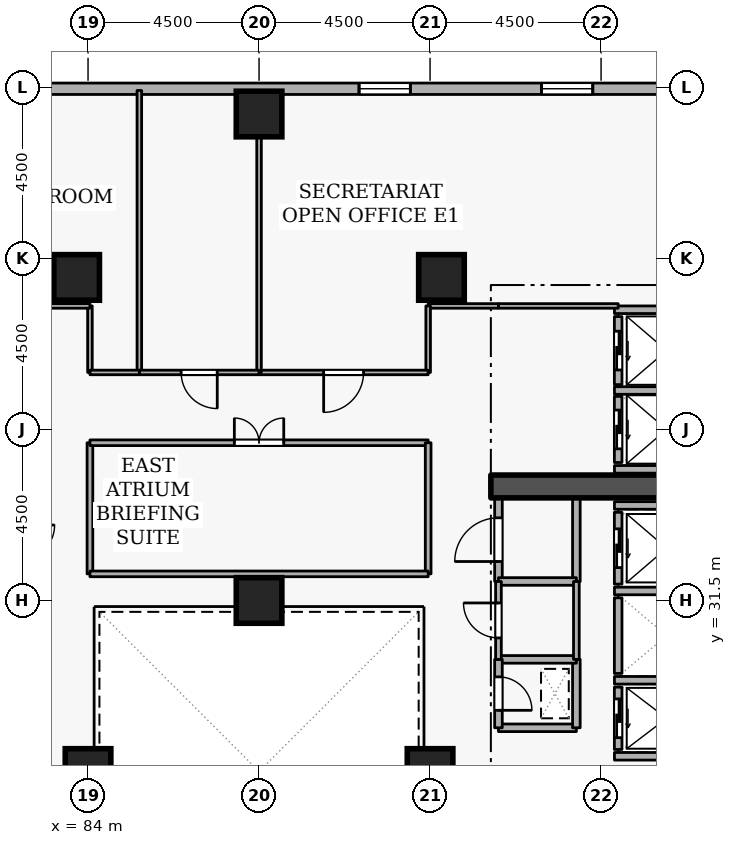
"""IFC4 building model, lengths in metres.
Left out: names, types, materials, properties, quantities, classifications, styles, units other than length and angle.
Written with IfcOpenShell. Run it as: python <this file> out.ifc"""

import sys

from ifc_helpers import new_model, si_unit, direction, frame, frame_2d, origin, origin_2d, place, context, subcontext, project, spatial, rectangle, extrude, element, fill, save


model = new_model("IFC4")
c1 = context("Model", 3, precision=1e-05, world=origin(), true_north=direction((0.0, 1.0)))
c2 = subcontext(c1, "Body", "Model", "MODEL_VIEW")
j1 = project(units=[si_unit("LENGTHUNIT", "METRE"), si_unit("PLANEANGLEUNIT", "RADIAN")], contexts=[c1])
p1 = place(None, origin())
s1 = spatial("IfcSite", under=j1, at=p1, CompositionType="ELEMENT")
p2 = place(p1, origin())
s2 = spatial("IfcBuilding", under=s1, at=p2, CompositionType="ELEMENT")
p3 = place(p2, frame((0.0, 0.0, 116.1)))
s3 = spatial("IfcBuildingStorey", under=s2, at=p3, CompositionType="ELEMENT", Elevation=116.1)
p4 = place(p3, frame((94.6, 34.5, 0.0), z_axis=(0.0, 0.0, 1.0), x_axis=(1.0, 0.0, 0.0)))
e1 = element("IfcWall", 1, at=p4, inside=s3, PredefinedType="SHEAR", context=c2, shape_type="SweptSolid", body=[
    extrude(rectangle(XDim=5.7, YDim=0.6, at=frame_2d((2.85, 0.0))), origin(), (0.0, 0.0, 1.0), 3.6),
])
for number, where, z_axis, x_axis in (
    (2, (88.5, 44.3, 0.0), (0.0, 0.0, 1.0), (1.0, 0.0, 0.0)),
    (3, (93.3, 40.0, 0.0), (0.0, 0.0, 1.0), (1.0, 0.0, 0.0)),
    (4, (83.7, 40.0, 0.0), (0.0, 0.0, 1.0), (1.0, 0.0, 0.0)),
    (5, (93.0, 27.0, 0.0), (0.0, 0.0, 1.0), (1.0, 0.0, 0.0)),
    (6, (84.0, 27.0, 0.0), (0.0, 0.0, 1.0), (1.0, 0.0, 0.0)),
    (7, (88.5, 31.5, 0.0), (0.0, 0.0, 1.0), (1.0, 0.0, 0.0)),
):
    element("IfcColumn", number, at=place(p3, frame(where, z_axis=z_axis, x_axis=x_axis)), inside=s3, PredefinedType="COLUMN", context=c2, shape_type="SweptSolid", body=[
        extrude(rectangle(XDim=1.2, YDim=1.2, at=origin_2d()), origin(), (0.0, 0.0, 1.0), 3.6),
    ])
p5 = place(p3, frame((103.881, 44.965, 0.0), z_axis=(0.0, 0.0, 1.0), x_axis=(-1.0, 0.0, 0.0)))
e8 = element("IfcWall", 8, at=p5, inside=s3, PredefinedType="STANDARD", context=c2, shape_type="SweptSolid", body=[
    extrude(rectangle(XDim=36.763, YDim=0.3, at=frame_2d((18.381, 0.0))), origin(), (0.0, 0.0, 1.0), 2.22),
])
p6 = place(p5, frame((6.6, 0.0, 0.72)))
e9 = element("IfcOpeningElement", 9, at=p6, cuts=e8, PredefinedType="OPENING", context=c2, shape_type="SweptSolid", body=[
    extrude(rectangle(XDim=1.35, YDim=1.05, at=frame_2d((0.675, 0.525))), frame((0.0, 0.16, 0.0), z_axis=(0.0, -1.0, 0.0), x_axis=(1.0, 0.0, 0.0)), (0.0, 0.0, 1.0), 0.32),
])
p7 = place(p5, frame((11.4, 0.0, 0.72)))
e10 = element("IfcOpeningElement", 10, at=p7, cuts=e8, PredefinedType="OPENING", context=c2, shape_type="SweptSolid", body=[
    extrude(rectangle(XDim=1.35, YDim=1.05, at=frame_2d((0.675, 0.525))), frame((0.0, 0.16, 0.0), z_axis=(0.0, -1.0, 0.0), x_axis=(1.0, 0.0, 0.0)), (0.0, 0.0, 1.0), 0.32),
])
p8 = place(p5, frame((21.0, 0.0, 0.72)))
e11 = element("IfcOpeningElement", 11, at=p8, cuts=e8, PredefinedType="OPENING", context=c2, shape_type="SweptSolid", body=[
    extrude(rectangle(XDim=1.35, YDim=1.05, at=frame_2d((0.675, 0.525))), frame((0.0, 0.16, 0.0), z_axis=(0.0, -1.0, 0.0), x_axis=(1.0, 0.0, 0.0)), (0.0, 0.0, 1.0), 0.32),
])
p9 = place(p5, frame((25.8, 0.0, 0.72)))
e12 = element("IfcOpeningElement", 12, at=p9, cuts=e8, PredefinedType="OPENING", context=c2, shape_type="SweptSolid", body=[
    extrude(rectangle(XDim=1.35, YDim=1.05, at=frame_2d((0.675, 0.525))), frame((0.0, 0.16, 0.0), z_axis=(0.0, -1.0, 0.0), x_axis=(1.0, 0.0, 0.0)), (0.0, 0.0, 1.0), 0.32),
])
p10 = place(p3, frame((97.95, 29.22, 0.0), z_axis=(0.0, 0.0, 1.0), x_axis=(0.0, -1.0, 0.0)))
e13 = element("IfcWall", 13, at=p10, inside=s3, PredefinedType="STANDARD", context=c2, shape_type="SweptSolid", body=[
    extrude(rectangle(XDim=1.64, YDim=0.2, at=frame_2d((0.82, 0.0))), origin(), (0.0, 0.0, 1.0), 3.32),
])
p11 = place(p10, frame((0.31, 0.0, 0.0)))
e14 = element("IfcOpeningElement", 14, at=p11, cuts=e13, PredefinedType="OPENING", context=c2, shape_type="SweptSolid", body=[
    extrude(rectangle(XDim=1.02, YDim=2.06, at=frame_2d((0.51, 1.03))), frame((0.0, 0.11, 0.0), z_axis=(0.0, -1.0, 0.0), x_axis=(1.0, 0.0, 0.0)), (0.0, 0.0, 1.0), 0.22),
])
p12 = place(p3, frame((97.95, 31.57, 0.0), z_axis=(0.0, 0.0, 1.0), x_axis=(0.0, -1.0, 0.0)))
e15 = element("IfcWall", 15, at=p12, inside=s3, PredefinedType="STANDARD", context=c2, shape_type="SweptSolid", body=[
    extrude(rectangle(XDim=1.99, YDim=0.2, at=frame_2d((0.995, 0.0))), origin(), (0.0, 0.0, 1.0), 3.32),
])
p13 = place(p3, frame((97.95, 33.82, 0.0), z_axis=(0.0, 0.0, 1.0), x_axis=(0.0, -1.0, 0.0)))
e16 = element("IfcWall", 16, at=p13, inside=s3, PredefinedType="STANDARD", context=c2, shape_type="SweptSolid", body=[
    extrude(rectangle(XDim=1.89, YDim=0.2, at=frame_2d((0.945, 0.0))), origin(), (0.0, 0.0, 1.0), 3.32),
])
p14 = place(p13, frame((0.435, 0.0, 0.0)))
e17 = element("IfcOpeningElement", 17, at=p14, cuts=e16, PredefinedType="OPENING", context=c2, shape_type="SweptSolid", body=[
    extrude(rectangle(XDim=1.02, YDim=2.06, at=frame_2d((0.51, 1.03))), frame((0.0, 0.11, 0.0), z_axis=(0.0, -1.0, 0.0), x_axis=(1.0, 0.0, 0.0)), (0.0, 0.0, 1.0), 0.22),
])
p15 = place(p3, frame((97.95, 36.87, 0.0), z_axis=(0.0, 0.0, 1.0), x_axis=(0.0, -1.0, 0.0)))
e18 = element("IfcWall", 18, at=p15, inside=s3, PredefinedType="STANDARD", context=c2, shape_type="SweptSolid", body=[
    extrude(rectangle(XDim=1.74, YDim=0.2, at=frame_2d((0.87, 0.0))), origin(), (0.0, 0.0, 1.0), 3.32),
])
p16 = place(p15, frame((0.36, 0.0, 0.0)))
e19 = element("IfcOpeningElement", 19, at=p16, cuts=e18, PredefinedType="OPENING", context=c2, shape_type="SweptSolid", body=[
    extrude(rectangle(XDim=1.02, YDim=2.06, at=frame_2d((0.51, 1.03))), frame((0.0, 0.11, 0.0), z_axis=(0.0, -1.0, 0.0), x_axis=(1.0, 0.0, 0.0)), (0.0, 0.0, 1.0), 0.22),
])
p17 = place(p3, frame((97.95, 38.97, 0.0), z_axis=(0.0, 0.0, 1.0), x_axis=(0.0, -1.0, 0.0)))
e20 = element("IfcWall", 20, at=p17, inside=s3, PredefinedType="STANDARD", context=c2, shape_type="SweptSolid", body=[
    extrude(rectangle(XDim=1.79, YDim=0.2, at=frame_2d((0.895, 0.0))), origin(), (0.0, 0.0, 1.0), 3.32),
])
p18 = place(p17, frame((0.385, 0.0, 0.0)))
e21 = element("IfcOpeningElement", 21, at=p18, cuts=e20, PredefinedType="OPENING", context=c2, shape_type="SweptSolid", body=[
    extrude(rectangle(XDim=1.02, YDim=2.06, at=frame_2d((0.51, 1.03))), frame((0.0, 0.11, 0.0), z_axis=(0.0, -1.0, 0.0), x_axis=(1.0, 0.0, 0.0)), (0.0, 0.0, 1.0), 0.22),
])
p19 = place(p3, frame((97.852, 29.4, 0.0), z_axis=(0.0, 0.0, 1.0), x_axis=(1.0, 0.0, 0.0)))
e22 = element("IfcWall", 22, at=p19, inside=s3, PredefinedType="STANDARD", context=c2, shape_type="SweptSolid", body=[
    extrude(rectangle(XDim=2.436, YDim=0.2, at=frame_2d((1.218, 0.0))), origin(), (0.0, 0.0, 1.0), 3.32),
])
p20 = place(p3, frame((97.852, 27.4, 0.0), z_axis=(0.0, 0.0, 1.0), x_axis=(1.0, 0.0, 0.0)))
e23 = element("IfcWall", 23, at=p20, inside=s3, PredefinedType="STANDARD", context=c2, shape_type="SweptSolid", body=[
    extrude(rectangle(XDim=2.436, YDim=0.2, at=frame_2d((1.218, 0.0))), origin(), (0.0, 0.0, 1.0), 1.685),
])
for number, where, z_axis, x_axis in (
    (24, (97.852, 31.75, 0.0), (0.0, 0.0, 1.0), (1.0, 0.0, 0.0)),
    (25, (97.852, 34.0, 0.0), (0.0, 0.0, 1.0), (1.0, 0.0, 0.0)),
):
    element("IfcWall", number, at=place(p3, frame(where, z_axis=z_axis, x_axis=x_axis)), inside=s3, PredefinedType="STANDARD", context=c2, shape_type="SweptSolid", body=[
        extrude(rectangle(XDim=2.436, YDim=0.2, at=frame_2d((1.218, 0.0))), origin(), (0.0, 0.0, 1.0), 3.32),
    ])
for number, where, z_axis, x_axis in (
    (26, (97.852, 37.025, 0.0), (0.0, 0.0, 1.0), (1.0, 0.0, 0.0)),
    (27, (97.852, 34.95, 0.0), (0.0, 0.0, 1.0), (1.0, 0.0, 0.0)),
):
    element("IfcWall", number, at=place(p3, frame(where, z_axis=z_axis, x_axis=x_axis)), inside=s3, PredefinedType="STANDARD", context=c2, shape_type="SweptSolid", body=[
        extrude(rectangle(XDim=2.746, YDim=0.2, at=frame_2d((1.373, 0.0))), origin(), (0.0, 0.0, 1.0), 3.32),
    ])
p21 = place(p3, frame((97.852, 39.15, 0.0), z_axis=(0.0, 0.0, 1.0), x_axis=(1.0, 0.0, 0.0)))
e28 = element("IfcWall", 28, at=p21, inside=s3, PredefinedType="STANDARD", context=c2, shape_type="SweptSolid", body=[
    extrude(rectangle(XDim=2.636, YDim=0.2, at=frame_2d((1.318, 0.0))), origin(), (0.0, 0.0, 1.0), 3.32),
])
p22 = place(p3, frame((94.8, 28.15, 0.0), z_axis=(0.0, 0.0, 1.0), x_axis=(1.0, 0.0, 0.0)))
e29 = element("IfcWall", 29, at=p22, inside=s3, PredefinedType="STANDARD", context=c2, shape_type="SweptSolid", body=[
    extrude(rectangle(XDim=2.05, YDim=0.2, at=frame_2d((1.025, 0.0))), origin(), (0.0, 0.0, 1.0), 3.32),
])
p23 = place(p3, frame((96.85, 28.15, 0.0), z_axis=(0.0, 0.0, 1.0), x_axis=(0.0, 1.0, 0.0)))
e30 = element("IfcWall", 30, at=p23, inside=s3, PredefinedType="STANDARD", context=c2, shape_type="SweptSolid", body=[
    extrude(rectangle(XDim=1.8, YDim=0.2, at=frame_2d((0.9, 0.0))), origin(), (0.0, 0.0, 1.0), 3.32),
])
p24 = place(p3, frame((96.85, 29.95, 0.0), z_axis=(0.0, 0.0, 1.0), x_axis=(-1.0, 0.0, 0.0)))
e31 = element("IfcWall", 31, at=p24, inside=s3, PredefinedType="STANDARD", context=c2, shape_type="SweptSolid", body=[
    extrude(rectangle(XDim=2.05, YDim=0.2, at=frame_2d((1.025, 0.0))), origin(), (0.0, 0.0, 1.0), 3.32),
])
p25 = place(p3, frame((94.8, 29.95, 0.0), z_axis=(0.0, 0.0, 1.0), x_axis=(0.0, -1.0, 0.0)))
e32 = element("IfcWall", 32, at=p25, inside=s3, PredefinedType="STANDARD", context=c2, shape_type="SweptSolid", body=[
    extrude(rectangle(XDim=1.8, YDim=0.2, at=frame_2d((0.9, 0.0))), origin(), (0.0, 0.0, 1.0), 3.32),
])
p26 = place(p25, frame((0.46, 0.0, 0.0)))
e33 = element("IfcOpeningElement", 33, at=p26, cuts=e32, PredefinedType="OPENING", context=c2, shape_type="SweptSolid", body=[
    extrude(rectangle(XDim=0.88, YDim=2.04, at=frame_2d((0.44, 1.02))), frame((0.0, 0.11, 0.0), z_axis=(0.0, -1.0, 0.0), x_axis=(1.0, 0.0, 0.0)), (0.0, 0.0, 1.0), 0.22),
])
p27 = place(p3, frame((94.8, 32.0, 0.0), z_axis=(0.0, 0.0, 1.0), x_axis=(0.0, 1.0, 0.0)))
e34 = element("IfcWall", 34, at=p27, inside=s3, PredefinedType="STANDARD", context=c2, shape_type="SweptSolid", body=[
    extrude(rectangle(XDim=2.2, YDim=0.2, at=frame_2d((1.1, 0.0))), origin(), (0.0, 0.0, 1.0), 3.32),
])
p28 = place(p27, frame((0.525, 0.0, 0.0)))
e35 = element("IfcOpeningElement", 35, at=p28, cuts=e34, PredefinedType="OPENING", context=c2, shape_type="SweptSolid", body=[
    extrude(rectangle(XDim=1.15, YDim=2.1, at=frame_2d((0.575, 1.05))), frame((0.0, 0.11, 0.0), z_axis=(0.0, -1.0, 0.0), x_axis=(1.0, 0.0, 0.0)), (0.0, 0.0, 1.0), 0.22),
])
p29 = place(p3, frame((96.85, 34.2, 0.0), z_axis=(0.0, 0.0, 1.0), x_axis=(0.0, -1.0, 0.0)))
e36 = element("IfcWall", 36, at=p29, inside=s3, PredefinedType="STANDARD", context=c2, shape_type="SweptSolid", body=[
    extrude(rectangle(XDim=2.2, YDim=0.2, at=frame_2d((1.1, 0.0))), origin(), (0.0, 0.0, 1.0), 3.32),
])
p30 = place(p3, frame((96.85, 32.0, 0.0), z_axis=(0.0, 0.0, 1.0), x_axis=(-1.0, 0.0, 0.0)))
e37 = element("IfcWall", 37, at=p30, inside=s3, PredefinedType="STANDARD", context=c2, shape_type="SweptSolid", body=[
    extrude(rectangle(XDim=2.05, YDim=0.2, at=frame_2d((1.025, 0.0))), origin(), (0.0, 0.0, 1.0), 3.32),
])
p31 = place(p3, frame((94.8, 29.95, 0.0), z_axis=(0.0, 0.0, 1.0), x_axis=(0.0, 1.0, 0.0)))
e38 = element("IfcWall", 38, at=p31, inside=s3, PredefinedType="PARTITIONING", context=c2, shape_type="SweptSolid", body=[
    extrude(rectangle(XDim=2.05, YDim=0.15, at=frame_2d((1.025, 0.0))), origin(), (0.0, 0.0, 1.0), 3.32),
])
p32 = place(p31, frame((0.565, 0.0, 0.0)))
e39 = element("IfcOpeningElement", 39, at=p32, cuts=e38, PredefinedType="OPENING", context=c2, shape_type="SweptSolid", body=[
    extrude(rectangle(XDim=0.92, YDim=2.08, at=frame_2d((0.46, 1.04))), frame((0.0, 0.085, 0.0), z_axis=(0.0, -1.0, 0.0), x_axis=(1.0, 0.0, 0.0)), (0.0, 0.0, 1.0), 0.17),
])
p33 = place(p3, frame((96.85, 32.0, 0.0), z_axis=(0.0, 0.0, 1.0), x_axis=(0.0, -1.0, 0.0)))
e40 = element("IfcWall", 40, at=p33, inside=s3, PredefinedType="PARTITIONING", context=c2, shape_type="SweptSolid", body=[
    extrude(rectangle(XDim=2.05, YDim=0.15, at=frame_2d((1.025, 0.0))), origin(), (0.0, 0.0, 1.0), 3.32),
])
p34 = place(p3, frame((97.95, 39.25, 0.0), z_axis=(0.0, 0.0, 1.0), x_axis=(-1.0, 0.0, 0.0)))
e41 = element("IfcWall", 41, at=p34, inside=s3, PredefinedType="PARTITIONING", context=c2, shape_type="SweptSolid", body=[
    extrude(rectangle(XDim=3.15, YDim=0.12, at=frame_2d((1.575, 0.0))), origin(), (0.0, 0.0, 1.0), 3.32),
])
p35 = place(p3, frame((94.8, 39.25, 0.0), z_axis=(0.0, 0.0, 1.0), x_axis=(-1.0, 0.0, 0.0)))
e42 = element("IfcWall", 42, at=p35, inside=s3, PredefinedType="PARTITIONING", context=c2, shape_type="SweptSolid", body=[
    extrude(rectangle(XDim=1.85, YDim=0.12, at=frame_2d((0.925, 0.0))), origin(), (0.0, 0.0, 1.0), 3.32),
])
p36 = place(p3, frame((92.95, 39.25, 0.0), z_axis=(0.0, 0.0, 1.0), x_axis=(0.0, -1.0, 0.0)))
e43 = element("IfcWall", 43, at=p36, inside=s3, PredefinedType="PARTITIONING", context=c2, shape_type="SweptSolid", body=[
    extrude(rectangle(XDim=1.75, YDim=0.12, at=frame_2d((0.875, 0.0))), origin(), (0.0, 0.0, 1.0), 3.32),
])
p37 = place(p3, frame((92.95, 37.5, 0.0), z_axis=(0.0, 0.0, 1.0), x_axis=(-1.0, 0.0, 0.0)))
e44 = element("IfcWall", 44, at=p37, inside=s3, PredefinedType="PARTITIONING", context=c2, shape_type="SweptSolid", body=[
    extrude(rectangle(XDim=4.45, YDim=0.12, at=frame_2d((2.225, 0.0))), origin(), (0.0, 0.0, 1.0), 3.32),
])
p38 = place(p37, frame((1.7, 0.0, 0.0)))
e45 = element("IfcOpeningElement", 45, at=p38, cuts=e44, PredefinedType="OPENING", context=c2, shape_type="SweptSolid", body=[
    extrude(rectangle(XDim=1.05, YDim=2.1, at=frame_2d((0.525, 1.05))), frame((0.0, 0.07, 0.0), z_axis=(0.0, -1.0, 0.0), x_axis=(1.0, 0.0, 0.0)), (0.0, 0.0, 1.0), 0.14),
])
p39 = place(p3, frame((88.5, 37.5, 0.0), z_axis=(0.0, 0.0, 1.0), x_axis=(0.0, 1.0, 0.0)))
e46 = element("IfcWall", 46, at=p39, inside=s3, PredefinedType="PARTITIONING", context=c2, shape_type="SweptSolid", body=[
    extrude(rectangle(XDim=7.42, YDim=0.12, at=frame_2d((3.71, 0.0))), origin(), (0.0, 0.0, 1.0), 2.862),
])
p40 = place(p3, frame((85.35, 37.5, 0.0), z_axis=(0.0, 0.0, 1.0), x_axis=(0.0, 1.0, 0.0)))
e47 = element("IfcWall", 47, at=p40, inside=s3, PredefinedType="PARTITIONING", context=c2, shape_type="SweptSolid", body=[
    extrude(rectangle(XDim=7.42, YDim=0.12, at=frame_2d((3.71, 0.0))), origin(), (0.0, 0.0, 1.0), 3.32),
])
p41 = place(p3, frame((88.5, 37.5, 0.0), z_axis=(0.0, 0.0, 1.0), x_axis=(-1.0, 0.0, 0.0)))
e48 = element("IfcWall", 48, at=p41, inside=s3, PredefinedType="PARTITIONING", context=c2, shape_type="SweptSolid", body=[
    extrude(rectangle(XDim=3.15, YDim=0.12, at=frame_2d((1.575, 0.0))), origin(), (0.0, 0.0, 1.0), 3.32),
])
p42 = place(p41, frame((1.1, 0.0, 0.0)))
e49 = element("IfcOpeningElement", 49, at=p42, cuts=e48, PredefinedType="OPENING", context=c2, shape_type="SweptSolid", body=[
    extrude(rectangle(XDim=0.95, YDim=2.1, at=frame_2d((0.475, 1.05))), frame((0.0, 0.07, 0.0), z_axis=(0.0, -1.0, 0.0), x_axis=(1.0, 0.0, 0.0)), (0.0, 0.0, 1.0), 0.14),
])
p43 = place(p3, frame((84.05, 37.5, 0.0), z_axis=(0.0, 0.0, 1.0), x_axis=(0.0, 1.0, 0.0)))
e50 = element("IfcWall", 50, at=p43, inside=s3, PredefinedType="PARTITIONING", context=c2, shape_type="SweptSolid", body=[
    extrude(rectangle(XDim=1.75, YDim=0.12, at=frame_2d((0.875, 0.0))), origin(), (0.0, 0.0, 1.0), 3.32),
])
p44 = place(p3, frame((84.05, 39.25, 0.0), z_axis=(0.0, 0.0, 1.0), x_axis=(-1.0, 0.0, 0.0)))
e51 = element("IfcWall", 51, at=p44, inside=s3, PredefinedType="PARTITIONING", context=c2, shape_type="SweptSolid", body=[
    extrude(rectangle(XDim=1.85, YDim=0.12, at=frame_2d((0.925, 0.0))), origin(), (0.0, 0.0, 1.0), 3.32),
])
p45 = place(p3, frame((85.35, 37.5, 0.0), z_axis=(0.0, 0.0, 1.0), x_axis=(-1.0, 0.0, 0.0)))
e52 = element("IfcWall", 52, at=p45, inside=s3, PredefinedType="PARTITIONING", context=c2, shape_type="SweptSolid", body=[
    extrude(rectangle(XDim=1.3, YDim=0.12, at=frame_2d((0.65, 0.0))), origin(), (0.0, 0.0, 1.0), 3.32),
])
p46 = place(p3, frame((84.05, 32.2, 0.0), z_axis=(0.0, 0.0, 1.0), x_axis=(0.0, 1.0, 0.0)))
e53 = element("IfcWall", 53, at=p46, inside=s3, PredefinedType="PARTITIONING", context=c2, shape_type="SweptSolid", body=[
    extrude(rectangle(XDim=3.45, YDim=0.15, at=frame_2d((1.725, 0.0))), origin(), (0.0, 0.0, 1.0), 3.32),
])
p47 = place(p3, frame((84.05, 35.65, 0.0), z_axis=(0.0, 0.0, 1.0), x_axis=(1.0, 0.0, 0.0)))
e54 = element("IfcWall", 54, at=p47, inside=s3, PredefinedType="PARTITIONING", context=c2, shape_type="SweptSolid", body=[
    extrude(rectangle(XDim=8.9, YDim=0.15, at=frame_2d((4.45, 0.0))), origin(), (0.0, 0.0, 1.0), 3.32),
])
p48 = place(p47, frame((3.8, 0.0, 0.0)))
e55 = element("IfcOpeningElement", 55, at=p48, cuts=e54, PredefinedType="OPENING", context=c2, shape_type="SweptSolid", body=[
    extrude(rectangle(XDim=1.3, YDim=2.12, at=frame_2d((0.65, 1.06))), frame((0.0, 0.085, 0.0), z_axis=(0.0, -1.0, 0.0), x_axis=(1.0, 0.0, 0.0)), (0.0, 0.0, 1.0), 0.17),
])
p49 = place(p3, frame((92.95, 35.65, 0.0), z_axis=(0.0, 0.0, 1.0), x_axis=(0.0, -1.0, 0.0)))
e56 = element("IfcWall", 56, at=p49, inside=s3, PredefinedType="PARTITIONING", context=c2, shape_type="SweptSolid", body=[
    extrude(rectangle(XDim=3.45, YDim=0.15, at=frame_2d((1.725, 0.0))), origin(), (0.0, 0.0, 1.0), 3.32),
])
p50 = place(p3, frame((92.95, 32.2, 0.0), z_axis=(0.0, 0.0, 1.0), x_axis=(-1.0, 0.0, 0.0)))
e57 = element("IfcWall", 57, at=p50, inside=s3, PredefinedType="PARTITIONING", context=c2, shape_type="SweptSolid", body=[
    extrude(rectangle(XDim=8.9, YDim=0.15, at=frame_2d((4.45, 0.0))), origin(), (0.0, 0.0, 1.0), 3.32),
])
p51 = place(p6, origin())
e58 = element("IfcWindow", 58, at=p51, inside=s3, PartitioningType="SINGLE_PANEL", PredefinedType="WINDOW", context=c2, shape_type="SweptSolid", body=[
    extrude(rectangle(XDim=1.35, YDim=1.05, at=frame_2d((0.675, 0.525))), frame((0.0, 0.03, 0.0), z_axis=(0.0, -1.0, 0.0), x_axis=(1.0, 0.0, 0.0)), (0.0, 0.0, 1.0), 0.06),
])
fill(e9, e58)
p52 = place(p7, origin())
e59 = element("IfcWindow", 59, at=p52, inside=s3, PartitioningType="SINGLE_PANEL", PredefinedType="WINDOW", context=c2, shape_type="SweptSolid", body=[
    extrude(rectangle(XDim=1.35, YDim=1.05, at=frame_2d((0.675, 0.525))), frame((0.0, 0.03, 0.0), z_axis=(0.0, -1.0, 0.0), x_axis=(1.0, 0.0, 0.0)), (0.0, 0.0, 1.0), 0.06),
])
fill(e10, e59)
p53 = place(p11, origin())
e60 = element("IfcDoor", 60, at=p53, inside=s3, OperationType="SLIDING_TO_LEFT", PredefinedType="DOOR", context=c2, shape_type="SweptSolid", body=[
    extrude(rectangle(XDim=1.02, YDim=2.06, at=frame_2d((0.51, 1.03))), frame((0.0, 0.025, 0.0), z_axis=(0.0, -1.0, 0.0), x_axis=(1.0, 0.0, 0.0)), (0.0, 0.0, 1.0), 0.05),
])
fill(e14, e60)
p54 = place(p14, origin())
e61 = element("IfcDoor", 61, at=p54, inside=s3, OperationType="SLIDING_TO_LEFT", PredefinedType="DOOR", context=c2, shape_type="SweptSolid", body=[
    extrude(rectangle(XDim=1.02, YDim=2.06, at=frame_2d((0.51, 1.03))), frame((0.0, 0.025, 0.0), z_axis=(0.0, -1.0, 0.0), x_axis=(1.0, 0.0, 0.0)), (0.0, 0.0, 1.0), 0.05),
])
fill(e17, e61)
p55 = place(p16, origin())
e62 = element("IfcDoor", 62, at=p55, inside=s3, OperationType="SLIDING_TO_LEFT", PredefinedType="DOOR", context=c2, shape_type="SweptSolid", body=[
    extrude(rectangle(XDim=1.02, YDim=2.06, at=frame_2d((0.51, 1.03))), frame((0.0, 0.025, 0.0), z_axis=(0.0, -1.0, 0.0), x_axis=(1.0, 0.0, 0.0)), (0.0, 0.0, 1.0), 0.05),
])
fill(e19, e62)
p56 = place(p18, origin())
e63 = element("IfcDoor", 63, at=p56, inside=s3, OperationType="SLIDING_TO_LEFT", PredefinedType="DOOR", context=c2, shape_type="SweptSolid", body=[
    extrude(rectangle(XDim=1.02, YDim=2.06, at=frame_2d((0.51, 1.03))), frame((0.0, 0.025, 0.0), z_axis=(0.0, -1.0, 0.0), x_axis=(1.0, 0.0, 0.0)), (0.0, 0.0, 1.0), 0.05),
])
fill(e21, e63)
p57 = place(p26, origin())
e64 = element("IfcDoor", 64, at=p57, inside=s3, OperationType="SINGLE_SWING_RIGHT", PredefinedType="DOOR", context=c2, shape_type="SweptSolid", body=[
    extrude(rectangle(XDim=0.88, YDim=2.04, at=frame_2d((0.44, 1.02))), frame((0.0, 0.025, 0.0), z_axis=(0.0, -1.0, 0.0), x_axis=(1.0, 0.0, 0.0)), (0.0, 0.0, 1.0), 0.05),
])
fill(e33, e64)
p58 = place(p32, origin())
e65 = element("IfcDoor", 65, at=p58, inside=s3, OperationType="SINGLE_SWING_RIGHT", PredefinedType="DOOR", context=c2, shape_type="SweptSolid", body=[
    extrude(rectangle(XDim=0.92, YDim=2.08, at=frame_2d((0.46, 1.04))), frame((0.0, 0.025, 0.0), z_axis=(0.0, -1.0, 0.0), x_axis=(1.0, 0.0, 0.0)), (0.0, 0.0, 1.0), 0.05),
])
fill(e39, e65)
p59 = place(p28, origin())
e66 = element("IfcDoor", 66, at=p59, inside=s3, OperationType="SINGLE_SWING_LEFT", PredefinedType="DOOR", context=c2, shape_type="SweptSolid", body=[
    extrude(rectangle(XDim=1.15, YDim=2.1, at=frame_2d((0.575, 1.05))), frame((0.0, 0.025, 0.0), z_axis=(0.0, -1.0, 0.0), x_axis=(1.0, 0.0, 0.0)), (0.0, 0.0, 1.0), 0.05),
])
fill(e35, e66)
p60 = place(p38, origin())
e67 = element("IfcDoor", 67, at=p60, inside=s3, OperationType="SINGLE_SWING_RIGHT", PredefinedType="DOOR", context=c2, shape_type="SweptSolid", body=[
    extrude(rectangle(XDim=1.05, YDim=2.1, at=frame_2d((0.525, 1.05))), frame((0.0, 0.025, 0.0), z_axis=(0.0, -1.0, 0.0), x_axis=(1.0, 0.0, 0.0)), (0.0, 0.0, 1.0), 0.05),
])
fill(e45, e67)
p61 = place(p42, origin())
e68 = element("IfcDoor", 68, at=p61, inside=s3, OperationType="SINGLE_SWING_LEFT", PredefinedType="DOOR", context=c2, shape_type="SweptSolid", body=[
    extrude(rectangle(XDim=0.95, YDim=2.1, at=frame_2d((0.475, 1.05))), frame((0.0, 0.025, 0.0), z_axis=(0.0, -1.0, 0.0), x_axis=(1.0, 0.0, 0.0)), (0.0, 0.0, 1.0), 0.05),
])
fill(e49, e68)
p62 = place(p48, origin())
e69 = element("IfcDoor", 69, at=p62, inside=s3, OperationType="DOUBLE_DOOR_SINGLE_SWING", PredefinedType="DOOR", context=c2, shape_type="SweptSolid", body=[
    extrude(rectangle(XDim=1.3, YDim=2.12, at=frame_2d((0.65, 1.06))), frame((0.0, 0.025, 0.0), z_axis=(0.0, -1.0, 0.0), x_axis=(1.0, 0.0, 0.0)), (0.0, 0.0, 1.0), 0.05),
])
fill(e55, e69)
save(model, sys.argv[1])
